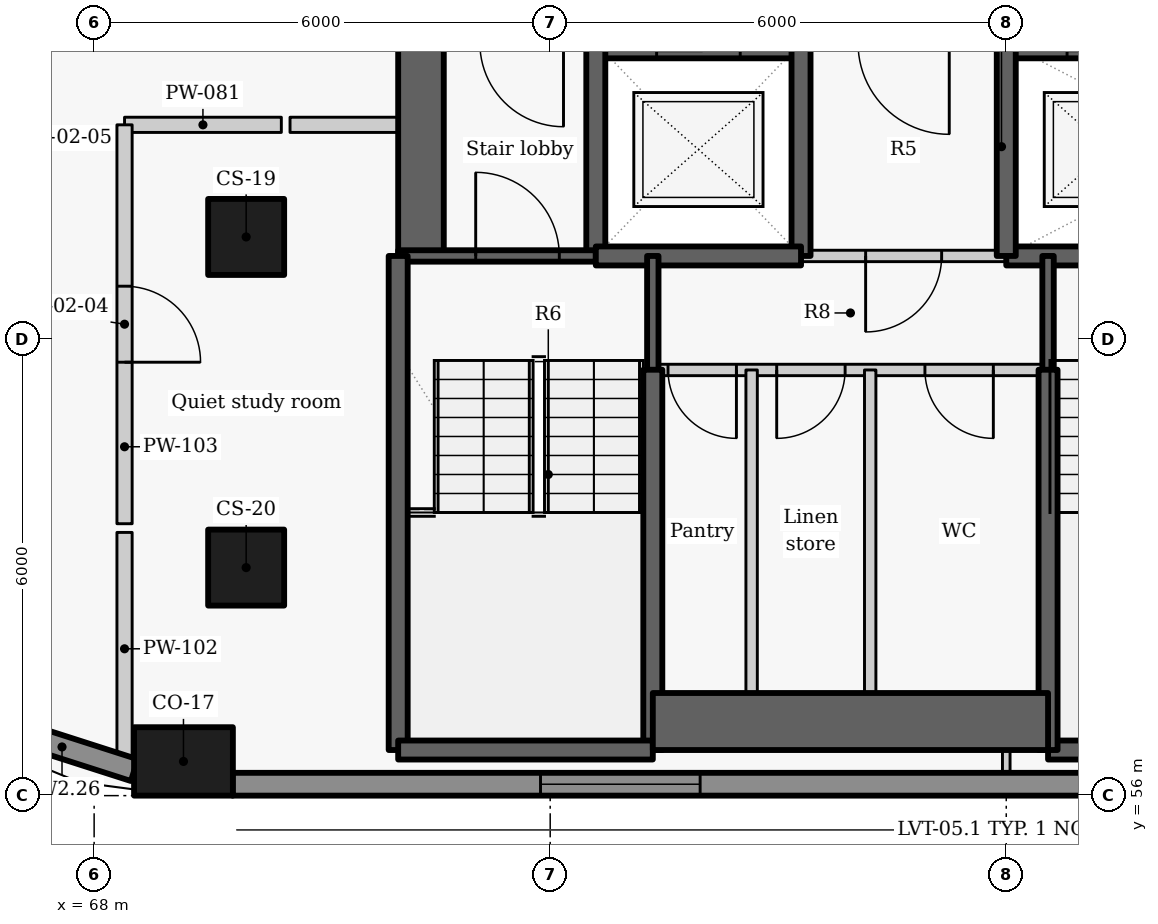
"""IFC4 building model, lengths in metres.
Left out: names, types, materials, properties, quantities, classifications, styles, units other than length and angle.
Written with IfcOpenShell. Run it as: python <this file> out.ifc"""

import sys

from ifc_helpers import new_model, si_unit, direction, frame, frame_2d, origin, origin_2d, place, context, subcontext, project, spatial, rectangle, extrude, element, fill, save


model = new_model("IFC4")
c1 = context("Model", 3, precision=1e-05, world=origin(), true_north=direction((0.0, 1.0)))
c2 = subcontext(c1, "Body", "Model", "MODEL_VIEW")
j1 = project(units=[si_unit("LENGTHUNIT", "METRE"), si_unit("PLANEANGLEUNIT", "RADIAN")], contexts=[c1])
p1 = place(None, origin())
s1 = spatial("IfcSite", under=j1, at=p1, CompositionType="ELEMENT")
p2 = place(p1, origin())
s2 = spatial("IfcBuilding", under=s1, at=p2, CompositionType="ELEMENT")
p3 = place(p2, frame((0.0, 0.0, 160.2)))
s3 = spatial("IfcBuildingStorey", under=s2, at=p3, CompositionType="ELEMENT", Elevation=160.2)
p4 = place(p3, frame((69.175, 56.45, 0.0), z_axis=(0.0, 0.0, 1.0), x_axis=(1.0, 0.0, 0.0)))
e1 = element("IfcColumn", 1, at=p4, inside=s3, PredefinedType="COLUMN", context=c2, shape_type="SweptSolid", body=[
    extrude(rectangle(XDim=1.3, YDim=0.9, at=origin_2d()), origin(), (0.0, 0.0, 1.0), 3.3),
])
for number, where, z_axis, x_axis in (
    (2, (70.0, 63.35, 0.0), (0.0, 0.0, 1.0), (0.0, -1.0, 0.0)),
    (3, (70.0, 59.0, 0.0), (0.0, 0.0, 1.0), (0.0, -1.0, 0.0)),
):
    element("IfcColumn", number, at=place(p3, frame(where, z_axis=z_axis, x_axis=x_axis)), inside=s3, PredefinedType="COLUMN", context=c2, shape_type="SweptSolid", body=[
        extrude(rectangle(XDim=1.0, YDim=1.0, at=origin_2d()), origin(), (0.0, 0.0, 1.0), 3.3),
    ])
p5 = place(p3, frame((66.626, 56.946, 0.0), z_axis=(0.0, 0.0, 1.0), x_axis=(0.952201240673, -0.305471434444, 0.0)))
e4 = element("IfcWall", 4, at=p5, inside=s3, PredefinedType="SOLIDWALL", context=c2, shape_type="SweptSolid", body=[
    extrude(rectangle(XDim=1.999, YDim=0.3, at=frame_2d((1.0, 0.0))), origin(), (0.0, 0.0, 1.0), 2.425),
])
p6 = place(p3, frame((69.821, 56.15, 0.0), z_axis=(0.0, 0.0, 1.0), x_axis=(1.0, 0.0, 0.0)))
e5 = element("IfcWall", 5, at=p6, inside=s3, PredefinedType="SOLIDWALL", context=c2, shape_type="SweptSolid", body=[
    extrude(rectangle(XDim=20.04, YDim=0.3, at=frame_2d((10.02, 0.0))), origin(), (0.0, 0.0, 1.0), 2.425),
])
p7 = place(p6, frame((4.051, 0.0, 0.9)))
e6 = element("IfcOpeningElement", 6, at=p7, cuts=e5, PredefinedType="OPENING", context=c2, shape_type="SweptSolid", body=[
    extrude(rectangle(XDim=2.1, YDim=1.1, at=frame_2d((1.05, 0.55))), frame((0.0, 0.16, 0.0), z_axis=(0.0, -1.0, 0.0), x_axis=(1.0, 0.0, 0.0)), (0.0, 0.0, 1.0), 0.32),
])
p8 = place(p6, frame((14.047, 0.0, 0.9)))
e7 = element("IfcOpeningElement", 7, at=p8, cuts=e5, PredefinedType="OPENING", context=c2, shape_type="SweptSolid", body=[
    extrude(rectangle(XDim=2.1, YDim=1.1, at=frame_2d((1.05, 0.55))), frame((0.0, 0.16, 0.0), z_axis=(0.0, -1.0, 0.0), x_axis=(1.0, 0.0, 0.0)), (0.0, 0.0, 1.0), 0.32),
])
p9 = place(p3, frame((72.3, 63.1, -0.275), z_axis=(0.0, 0.0, 1.0), x_axis=(0.0, 1.0, 0.0)))
e8 = element("IfcWall", 8, at=p9, inside=s3, PredefinedType="SHEAR", context=c2, shape_type="SweptSolid", body=[
    extrude(rectangle(XDim=9.1, YDim=0.6, at=frame_2d((4.55, 0.0))), origin(), (0.0, 0.0, 1.0), 3.3),
])
p10 = place(p9, frame((3.748, 0.0, 0.275)))
e9 = element("IfcOpeningElement", 9, at=p10, cuts=e8, PredefinedType="OPENING", context=c2, shape_type="SweptSolid", body=[
    extrude(rectangle(XDim=1.5, YDim=2.1, at=frame_2d((0.75, 1.05))), frame((0.0, 0.31, 0.0), z_axis=(0.0, -1.0, 0.0), x_axis=(1.0, 0.0, 0.0)), (0.0, 0.0, 1.0), 0.62),
])
p11 = place(p3, frame((74.597, 65.9, -0.275), z_axis=(0.0, 0.0, 1.0), x_axis=(1.0, 0.0, 0.0)))
e10 = element("IfcWall", 10, at=p11, inside=s3, PredefinedType="SHEAR", context=c2, shape_type="SweptSolid", body=[
    extrude(rectangle(XDim=2.706, YDim=0.4, at=frame_2d((1.353, 0.0))), origin(), (0.0, 0.0, 1.0), 3.3),
])
p12 = place(p11, frame((0.803, 0.0, 0.275)))
e11 = element("IfcOpeningElement", 11, at=p12, cuts=e10, PredefinedType="OPENING", context=c2, shape_type="SweptSolid", body=[
    extrude(rectangle(XDim=1.1, YDim=2.1, at=frame_2d((0.55, 1.05))), frame((0.0, 0.21, 0.0), z_axis=(0.0, -1.0, 0.0), x_axis=(1.0, 0.0, 0.0)), (0.0, 0.0, 1.0), 0.42),
])
p13 = place(p3, frame((79.997, 65.9, -0.275), z_axis=(0.0, 0.0, 1.0), x_axis=(1.0, 0.0, 0.0)))
e12 = element("IfcWall", 12, at=p13, inside=s3, PredefinedType="SHEAR", context=c2, shape_type="SweptSolid", body=[
    extrude(rectangle(XDim=5.406, YDim=0.4, at=frame_2d((2.703, 0.0))), origin(), (0.0, 0.0, 1.0), 3.3),
])
p14 = place(p13, frame((0.803, 0.0, 0.275)))
e13 = element("IfcOpeningElement", 13, at=p14, cuts=e12, PredefinedType="OPENING", context=c2, shape_type="SweptSolid", body=[
    extrude(rectangle(XDim=1.1, YDim=2.1, at=frame_2d((0.55, 1.05))), frame((0.0, 0.21, 0.0), z_axis=(0.0, -1.0, 0.0), x_axis=(1.0, 0.0, 0.0)), (0.0, 0.0, 1.0), 0.42),
])
p15 = place(p3, frame((74.6, 63.1, -0.275), z_axis=(0.0, 0.0, 1.0), x_axis=(0.0, 1.0, 0.0)))
e14 = element("IfcWall", 14, at=p15, inside=s3, PredefinedType="SHEAR", context=c2, shape_type="SweptSolid", body=[
    extrude(rectangle(XDim=2.8, YDim=0.25, at=frame_2d((1.4, 0.0))), origin(), (0.0, 0.0, 1.0), 3.3),
])
p16 = place(p3, frame((72.0, 63.1, -0.275), z_axis=(0.0, 0.0, 1.0), x_axis=(1.0, 0.0, 0.0)))
e15 = element("IfcWall", 15, at=p16, inside=s3, PredefinedType="SHEAR", context=c2, shape_type="SweptSolid", body=[
    extrude(rectangle(XDim=2.6, YDim=0.15, at=frame_2d((1.3, 0.0))), origin(), (0.0, 0.0, 1.0), 3.3),
])
p17 = place(p16, frame((1.02, 0.0, 0.275)))
e16 = element("IfcOpeningElement", 16, at=p17, cuts=e15, PredefinedType="OPENING", context=c2, shape_type="SweptSolid", body=[
    extrude(rectangle(XDim=1.1, YDim=2.1, at=frame_2d((0.55, 1.05))), frame((0.0, 0.085, 0.0), z_axis=(0.0, -1.0, 0.0), x_axis=(1.0, 0.0, 0.0)), (0.0, 0.0, 1.0), 0.17),
])
p18 = place(p3, frame((77.3, 63.1, -0.275), z_axis=(0.0, 0.0, 1.0), x_axis=(0.0, 1.0, 0.0)))
e17 = element("IfcWall", 17, at=p18, inside=s3, PredefinedType="SHEAR", context=c2, shape_type="SweptSolid", body=[
    extrude(rectangle(XDim=2.8, YDim=0.25, at=frame_2d((1.4, 0.0))), origin(), (0.0, 0.0, 1.0), 3.3),
])
p19 = place(p3, frame((74.6, 63.1, -0.275), z_axis=(0.0, 0.0, 1.0), x_axis=(1.0, 0.0, 0.0)))
e18 = element("IfcWall", 18, at=p19, inside=s3, PredefinedType="SHEAR", context=c2, shape_type="SweptSolid", body=[
    extrude(rectangle(XDim=2.7, YDim=0.25, at=frame_2d((1.35, 0.0))), origin(), (0.0, 0.0, 1.0), 3.3),
])
p20 = place(p3, frame((80.0, 63.1, -0.275), z_axis=(0.0, 0.0, 1.0), x_axis=(1.0, 0.0, 0.0)))
e19 = element("IfcWall", 19, at=p20, inside=s3, PredefinedType="SHEAR", context=c2, shape_type="SweptSolid", body=[
    extrude(rectangle(XDim=8.0, YDim=0.25, at=frame_2d((4.0, 0.0))), origin(), (0.0, 0.0, 1.0), 3.3),
])
p21 = place(p20, frame((3.849, 0.0, 0.275)))
e20 = element("IfcOpeningElement", 20, at=p21, cuts=e19, PredefinedType="OPENING", context=c2, shape_type="SweptSolid", body=[
    extrude(rectangle(XDim=1.1, YDim=2.1, at=frame_2d((0.55, 1.05))), frame((0.0, 0.135, 0.0), z_axis=(0.0, -1.0, 0.0), x_axis=(1.0, 0.0, 0.0)), (0.0, 0.0, 1.0), 0.27),
])
p22 = place(p3, frame((80.0, 63.1, -0.275), z_axis=(0.0, 0.0, 1.0), x_axis=(0.0, 1.0, 0.0)))
e21 = element("IfcWall", 21, at=p22, inside=s3, PredefinedType="SHEAR", context=c2, shape_type="SweptSolid", body=[
    extrude(rectangle(XDim=2.8, YDim=0.25, at=frame_2d((1.4, 0.0))), origin(), (0.0, 0.0, 1.0), 3.3),
])
p23 = place(p3, frame((80.0, 63.1, 0.0), z_axis=(0.0, 0.0, 1.0), x_axis=(-1.0, 0.0, 0.0)))
e22 = element("IfcWall", 22, at=p23, inside=s3, PredefinedType="PARTITIONING", context=c2, shape_type="SweptSolid", body=[
    extrude(rectangle(XDim=2.7, YDim=0.15, at=frame_2d((1.35, 0.0))), origin(), (0.0, 0.0, 1.0), 3.025),
])
p24 = place(p23, frame((0.85, 0.0, 0.0)))
e23 = element("IfcOpeningElement", 23, at=p24, cuts=e22, PredefinedType="OPENING", context=c2, shape_type="SweptSolid", body=[
    extrude(rectangle(XDim=1.0, YDim=2.1, at=frame_2d((0.5, 1.05))), frame((0.0, 0.085, 0.0), z_axis=(0.0, -1.0, 0.0), x_axis=(1.0, 0.0, 0.0)), (0.0, 0.0, 1.0), 0.17),
])
p25 = place(p3, frame((75.35, 61.597, -0.275), z_axis=(0.0, 0.0, 1.0), x_axis=(0.0, 1.0, 0.0)))
e24 = element("IfcWall", 24, at=p25, inside=s3, PredefinedType="SHEAR", context=c2, shape_type="SweptSolid", body=[
    extrude(rectangle(XDim=1.503, YDim=0.15, at=frame_2d((0.751, 0.0))), origin(), (0.0, 0.0, 1.0), 3.3),
])
p26 = place(p3, frame((75.35, 56.6, -0.275), z_axis=(0.0, 0.0, 1.0), x_axis=(0.0, 1.0, 0.0)))
e25 = element("IfcWall", 25, at=p26, inside=s3, PredefinedType="SHEAR", context=c2, shape_type="SweptSolid", body=[
    extrude(rectangle(XDim=5.003, YDim=0.25, at=frame_2d((2.501, 0.0))), origin(), (0.0, 0.0, 1.0), 3.3),
])
p27 = place(p3, frame((72.0, 56.6, -0.275), z_axis=(0.0, 0.0, 1.0), x_axis=(0.0, 1.0, 0.0)))
e26 = element("IfcWall", 26, at=p27, inside=s3, PredefinedType="SHEAR", context=c2, shape_type="SweptSolid", body=[
    extrude(rectangle(XDim=6.5, YDim=0.25, at=frame_2d((3.25, 0.0))), origin(), (0.0, 0.0, 1.0), 3.3),
])
p28 = place(p3, frame((72.0, 56.6, -0.275), z_axis=(0.0, 0.0, 1.0), x_axis=(1.0, 0.0, 0.0)))
e27 = element("IfcWall", 27, at=p28, inside=s3, PredefinedType="SHEAR", context=c2, shape_type="SweptSolid", body=[
    extrude(rectangle(XDim=3.35, YDim=0.25, at=frame_2d((1.675, 0.0))), origin(), (0.0, 0.0, 1.0), 3.3),
])
p29 = place(p3, frame((80.55, 56.6, -0.275), z_axis=(0.0, 0.0, 1.0), x_axis=(1.0, 0.0, 0.0)))
e28 = element("IfcWall", 28, at=p29, inside=s3, PredefinedType="SHEAR", context=c2, shape_type="SweptSolid", body=[
    extrude(rectangle(XDim=2.85, YDim=0.25, at=frame_2d((1.425, 0.0))), origin(), (0.0, 0.0, 1.0), 3.3),
])
p30 = place(p3, frame((80.55, 61.597, -0.275), z_axis=(0.0, 0.0, 1.0), x_axis=(0.0, 1.0, 0.0)))
e29 = element("IfcWall", 29, at=p30, inside=s3, PredefinedType="SHEAR", context=c2, shape_type="SweptSolid", body=[
    extrude(rectangle(XDim=1.503, YDim=0.15, at=frame_2d((0.751, 0.0))), origin(), (0.0, 0.0, 1.0), 3.3),
])
p31 = place(p3, frame((80.55, 56.6, -0.275), z_axis=(0.0, 0.0, 1.0), x_axis=(0.0, 1.0, 0.0)))
e30 = element("IfcWall", 30, at=p31, inside=s3, PredefinedType="SHEAR", context=c2, shape_type="SweptSolid", body=[
    extrude(rectangle(XDim=5.003, YDim=0.25, at=frame_2d((2.501, 0.0))), origin(), (0.0, 0.0, 1.0), 3.3),
])
p32 = place(p3, frame((75.35, 56.975, -0.275), z_axis=(0.0, 0.0, 1.0), x_axis=(1.0, 0.0, 0.0)))
e31 = element("IfcWall", 31, at=p32, inside=s3, PredefinedType="SHEAR", context=c2, shape_type="SweptSolid", body=[
    extrude(rectangle(XDim=5.2, YDim=0.75, at=frame_2d((2.6, 0.0))), origin(), (0.0, 0.0, 1.0), 3.3),
])
p33 = place(p3, frame((80.55, 61.6, 0.0), z_axis=(0.0, 0.0, 1.0), x_axis=(-1.0, 0.0, 0.0)))
e32 = element("IfcWall", 32, at=p33, inside=s3, PredefinedType="PARTITIONING", context=c2, shape_type="SweptSolid", body=[
    extrude(rectangle(XDim=5.2, YDim=0.15, at=frame_2d((2.6, 0.0))), origin(), (0.0, 0.0, 1.0), 3.025),
])
p34 = place(p33, frame((4.1, 0.0, 0.0)))
e33 = element("IfcOpeningElement", 33, at=p34, cuts=e32, PredefinedType="OPENING", context=c2, shape_type="SweptSolid", body=[
    extrude(rectangle(XDim=0.9, YDim=2.1, at=frame_2d((0.45, 1.05))), frame((0.0, 0.085, 0.0), z_axis=(0.0, -1.0, 0.0), x_axis=(1.0, 0.0, 0.0)), (0.0, 0.0, 1.0), 0.17),
])
p35 = place(p33, frame((2.67, 0.0, 0.0)))
e34 = element("IfcOpeningElement", 34, at=p35, cuts=e32, PredefinedType="OPENING", context=c2, shape_type="SweptSolid", body=[
    extrude(rectangle(XDim=0.9, YDim=2.1, at=frame_2d((0.45, 1.05))), frame((0.0, 0.085, 0.0), z_axis=(0.0, -1.0, 0.0), x_axis=(1.0, 0.0, 0.0)), (0.0, 0.0, 1.0), 0.17),
])
p36 = place(p33, frame((0.72, 0.0, 0.0)))
e35 = element("IfcOpeningElement", 35, at=p36, cuts=e32, PredefinedType="OPENING", context=c2, shape_type="SweptSolid", body=[
    extrude(rectangle(XDim=0.9, YDim=2.1, at=frame_2d((0.45, 1.05))), frame((0.0, 0.085, 0.0), z_axis=(0.0, -1.0, 0.0), x_axis=(1.0, 0.0, 0.0)), (0.0, 0.0, 1.0), 0.17),
])
for number, where, z_axis, x_axis in (
    (36, (76.65, 56.6, 0.0), (0.0, 0.0, 1.0), (0.0, 1.0, 0.0)),
    (37, (78.21, 56.6, 0.0), (0.0, 0.0, 1.0), (0.0, 1.0, 0.0)),
):
    element("IfcWall", number, at=place(p3, frame(where, z_axis=z_axis, x_axis=x_axis)), inside=s3, PredefinedType="PARTITIONING", context=c2, shape_type="SweptSolid", body=[
        extrude(rectangle(XDim=5.0, YDim=0.15, at=frame_2d((2.5, 0.0))), origin(), (0.0, 0.0, 1.0), 3.025),
    ])
p37 = place(p3, frame((68.4, 64.825, 0.0), z_axis=(0.0, 0.0, 1.0), x_axis=(1.0, 0.0, 0.0)))
e38 = element("IfcWall", 38, at=p37, inside=s3, PredefinedType="PARTITIONING", context=c2, shape_type="SweptSolid", body=[
    extrude(rectangle(XDim=2.063, YDim=0.2, at=frame_2d((1.031, 0.0))), origin(), (0.0, 0.0, 1.0), 2.505),
])
p38 = place(p3, frame((70.577, 64.825, 0.0), z_axis=(0.0, 0.0, 1.0), x_axis=(1.0, 0.0, 0.0)))
e39 = element("IfcWall", 39, at=p38, inside=s3, PredefinedType="PARTITIONING", context=c2, shape_type="SweptSolid", body=[
    extrude(rectangle(XDim=1.423, YDim=0.2, at=frame_2d((0.711, 0.0))), origin(), (0.0, 0.0, 1.0), 3.025),
])
p39 = place(p3, frame((68.4, 56.401, 0.0), z_axis=(0.0, 0.0, 1.0), x_axis=(0.0, 1.0, 0.0)))
e40 = element("IfcWall", 40, at=p39, inside=s3, PredefinedType="PARTITIONING", context=c2, shape_type="SweptSolid", body=[
    extrude(rectangle(XDim=3.062, YDim=0.2, at=frame_2d((1.531, 0.0))), origin(), (0.0, 0.0, 1.0), 2.405),
])
p40 = place(p3, frame((68.4, 64.825, 0.0), z_axis=(0.0, 0.0, 1.0), x_axis=(0.0, -1.0, 0.0)))
e41 = element("IfcWall", 41, at=p40, inside=s3, PredefinedType="PARTITIONING", context=c2, shape_type="SweptSolid", body=[
    extrude(rectangle(XDim=5.248, YDim=0.2, at=frame_2d((2.624, 0.0))), origin(), (0.0, 0.0, 1.0), 3.025),
])
p41 = place(p40, frame((2.123, 0.0, 0.0)))
e42 = element("IfcOpeningElement", 42, at=p41, cuts=e41, PredefinedType="OPENING", context=c2, shape_type="SweptSolid", body=[
    extrude(rectangle(XDim=1.0, YDim=2.1, at=frame_2d((0.5, 1.05))), frame((0.0, 0.11, 0.0), z_axis=(0.0, -1.0, 0.0), x_axis=(1.0, 0.0, 0.0)), (0.0, 0.0, 1.0), 0.22),
])
p42 = place(p3, frame((80.0, 56.3, 0.0), z_axis=(0.0, 0.0, 1.0), x_axis=(0.0, 1.0, 0.0)))
e43 = element("IfcWall", 43, at=p42, inside=s3, PredefinedType="PARTITIONING", context=c2, shape_type="SweptSolid", body=[
    extrude(rectangle(XDim=0.3, YDim=0.1, at=frame_2d((0.15, 0.0))), origin(), (0.0, 0.0, 1.0), 3.025),
])
p43 = place(p7, origin())
e44 = element("IfcWindow", 44, at=p43, inside=s3, PartitioningType="SINGLE_PANEL", PredefinedType="WINDOW", context=c2, shape_type="SweptSolid", body=[
    extrude(rectangle(XDim=2.1, YDim=1.1, at=frame_2d((1.05, 0.55))), frame((0.0, 0.03, 0.0), z_axis=(0.0, -1.0, 0.0), x_axis=(1.0, 0.0, 0.0)), (0.0, 0.0, 1.0), 0.06),
])
fill(e6, e44)
p44 = place(p24, origin())
e45 = element("IfcDoor", 45, at=p44, inside=s3, OperationType="SINGLE_SWING_RIGHT", PredefinedType="DOOR", context=c2, shape_type="SweptSolid", body=[
    extrude(rectangle(XDim=1.0, YDim=2.1, at=frame_2d((0.5, 1.05))), frame((0.0, 0.025, 0.0), z_axis=(0.0, -1.0, 0.0), x_axis=(1.0, 0.0, 0.0)), (0.0, 0.0, 1.0), 0.05),
])
fill(e23, e45)
p45 = place(p34, origin())
e46 = element("IfcDoor", 46, at=p45, inside=s3, OperationType="SINGLE_SWING_LEFT", PredefinedType="DOOR", context=c2, shape_type="SweptSolid", body=[
    extrude(rectangle(XDim=0.9, YDim=2.1, at=frame_2d((0.45, 1.05))), frame((0.0, 0.025, 0.0), z_axis=(0.0, -1.0, 0.0), x_axis=(1.0, 0.0, 0.0)), (0.0, 0.0, 1.0), 0.05),
])
fill(e33, e46)
p46 = place(p35, origin())
e47 = element("IfcDoor", 47, at=p46, inside=s3, OperationType="SINGLE_SWING_RIGHT", PredefinedType="DOOR", context=c2, shape_type="SweptSolid", body=[
    extrude(rectangle(XDim=0.9, YDim=2.1, at=frame_2d((0.45, 1.05))), frame((0.0, 0.025, 0.0), z_axis=(0.0, -1.0, 0.0), x_axis=(1.0, 0.0, 0.0)), (0.0, 0.0, 1.0), 0.05),
])
fill(e34, e47)
p47 = place(p36, origin())
e48 = element("IfcDoor", 48, at=p47, inside=s3, OperationType="SINGLE_SWING_LEFT", PredefinedType="DOOR", context=c2, shape_type="SweptSolid", body=[
    extrude(rectangle(XDim=0.9, YDim=2.1, at=frame_2d((0.45, 1.05))), frame((0.0, 0.025, 0.0), z_axis=(0.0, -1.0, 0.0), x_axis=(1.0, 0.0, 0.0)), (0.0, 0.0, 1.0), 0.05),
])
fill(e35, e48)
p48 = place(p17, origin())
e49 = element("IfcDoor", 49, at=p48, inside=s3, OperationType="SINGLE_SWING_LEFT", PredefinedType="DOOR", context=c2, shape_type="SweptSolid", body=[
    extrude(rectangle(XDim=1.1, YDim=2.1, at=frame_2d((0.55, 1.05))), frame((0.0, 0.025, 0.0), z_axis=(0.0, -1.0, 0.0), x_axis=(1.0, 0.0, 0.0)), (0.0, 0.0, 1.0), 0.05),
])
fill(e16, e49)
p49 = place(p41, origin())
e50 = element("IfcDoor", 50, at=p49, inside=s3, OperationType="SINGLE_SWING_RIGHT", PredefinedType="DOOR", context=c2, shape_type="SweptSolid", body=[
    extrude(rectangle(XDim=1.0, YDim=2.1, at=frame_2d((0.5, 1.05))), frame((0.0, 0.025, 0.0), z_axis=(0.0, -1.0, 0.0), x_axis=(1.0, 0.0, 0.0)), (0.0, 0.0, 1.0), 0.05),
])
fill(e42, e50)
save(model, sys.argv[1])
